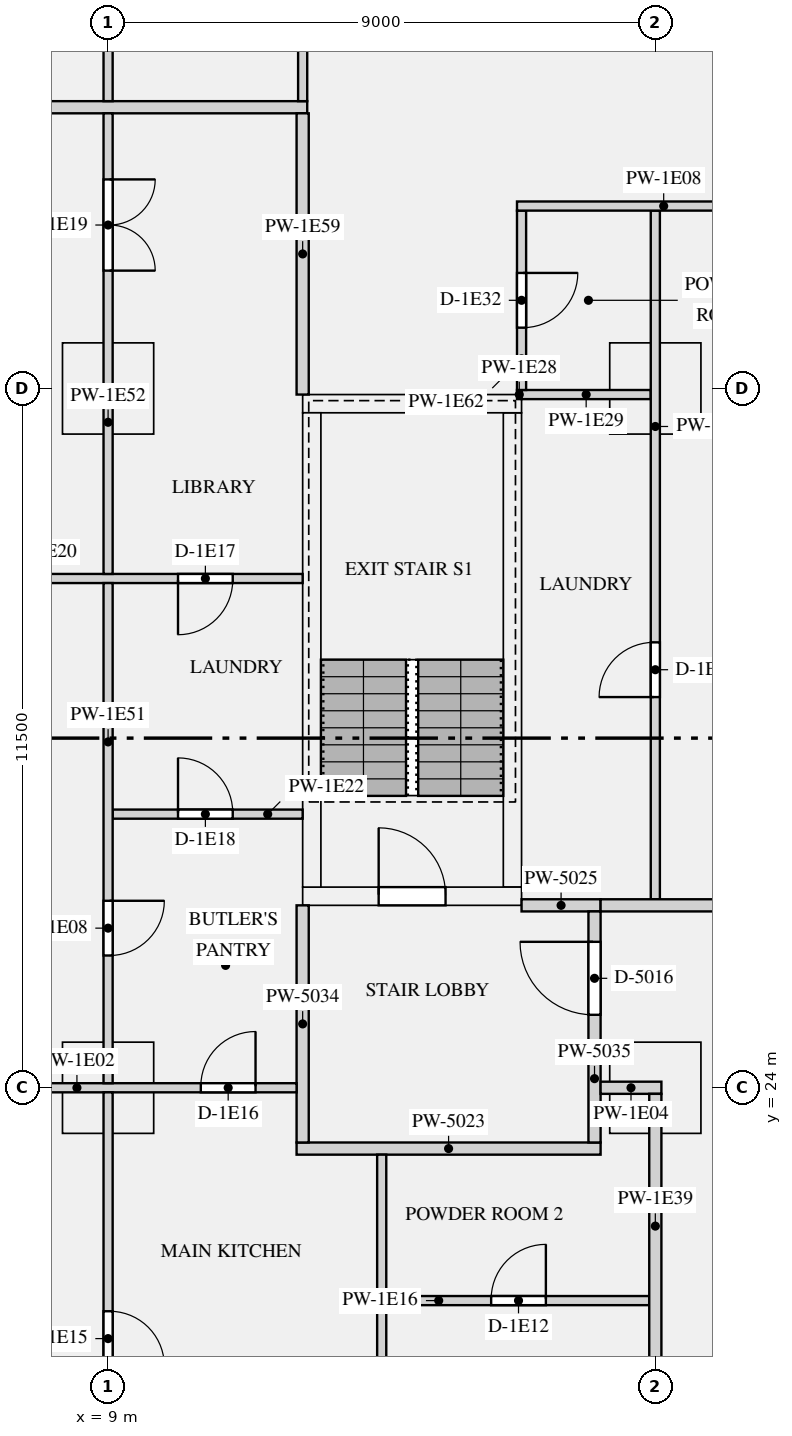
"""IFC4 building model, lengths in metres.
Left out: names, types, materials, properties, quantities, classifications, styles, units other than length and angle.
Written with IfcOpenShell. Run it as: python <this file> out.ifc"""

import sys

from ifc_helpers import new_model, si_unit, direction, frame, frame_2d, origin, origin_2d, place, context, subcontext, project, spatial, rectangle, extrude, element, fill, save


model = new_model("IFC4")
c1 = context("Model", 3, precision=1e-05, world=origin(), true_north=direction((0.0, 1.0)))
c2 = subcontext(c1, "Body", "Model", "MODEL_VIEW")
j1 = project(units=[si_unit("LENGTHUNIT", "METRE"), si_unit("PLANEANGLEUNIT", "RADIAN")], contexts=[c1])
p1 = place(None, origin())
s1 = spatial("IfcSite", under=j1, at=p1, CompositionType="ELEMENT")
p2 = place(p1, origin())
s2 = spatial("IfcBuilding", under=s1, at=p2, CompositionType="ELEMENT")
p3 = place(p2, frame((0.0, 0.0, 54.15)))
s3 = spatial("IfcBuildingStorey", under=s2, at=p3, CompositionType="ELEMENT", Elevation=54.15)
for number, where, z_axis, x_axis in (
    (1, (9.0, 24.0, 0.0), (0.0, 0.0, 1.0), (1.0, 0.0, 0.0)),
    (2, (18.0, 24.0, 0.0), (0.0, 0.0, 1.0), (1.0, 0.0, 0.0)),
    (3, (9.0, 35.5, 0.0), (0.0, 0.0, 1.0), (1.0, 0.0, 0.0)),
    (4, (18.0, 35.5, 0.0), (0.0, 0.0, 1.0), (1.0, 0.0, 0.0)),
):
    element("IfcColumn", number, at=place(p3, frame(where, z_axis=z_axis, x_axis=x_axis)), inside=s3, PredefinedType="COLUMN", context=c2, shape_type="SweptSolid", body=[
        extrude(rectangle(XDim=1.5, YDim=1.5, at=origin_2d()), origin(), (0.0, 0.0, 1.0), 3.15),
    ])
p4 = place(p3, frame((12.2, 27.15, 0.0), z_axis=(0.0, 0.0, 1.0), x_axis=(1.0, 0.0, 0.0)))
e5 = element("IfcWall", 5, at=p4, inside=s3, PredefinedType="SHEAR", context=c2, shape_type="SweptSolid", body=[
    extrude(rectangle(XDim=3.6, YDim=0.3, at=frame_2d((1.8, 0.0))), origin(), (0.0, 0.0, 1.0), 3.15),
])
p5 = place(p4, frame((1.25, 0.0, 0.0)))
e6 = element("IfcOpeningElement", 6, at=p5, cuts=e5, PredefinedType="OPENING", context=c2, shape_type="SweptSolid", body=[
    extrude(rectangle(XDim=1.1, YDim=2.1, at=frame_2d((0.55, 1.05))), frame((0.0, 0.16, 0.0), z_axis=(0.0, -1.0, 0.0), x_axis=(1.0, 0.0, 0.0)), (0.0, 0.0, 1.0), 0.32),
])
p6 = place(p3, frame((12.2, 35.25, 0.0), z_axis=(0.0, 0.0, 1.0), x_axis=(1.0, 0.0, 0.0)))
e7 = element("IfcWall", 7, at=p6, inside=s3, PredefinedType="SHEAR", context=c2, shape_type="SweptSolid", body=[
    extrude(rectangle(XDim=3.6, YDim=0.3, at=frame_2d((1.8, 0.0))), origin(), (0.0, 0.0, 1.0), 3.15),
])
for number, where, z_axis, x_axis in (
    (8, (12.35, 27.3, 0.0), (0.0, 0.0, 1.0), (0.0, 1.0, 0.0)),
    (9, (15.65, 27.3, 0.0), (0.0, 0.0, 1.0), (0.0, 1.0, 0.0)),
):
    element("IfcWall", number, at=place(p3, frame(where, z_axis=z_axis, x_axis=x_axis)), inside=s3, PredefinedType="SHEAR", context=c2, shape_type="SweptSolid", body=[
        extrude(rectangle(XDim=7.8, YDim=0.3, at=frame_2d((3.9, 0.0))), origin(), (0.0, 0.0, 1.0), 3.15),
    ])
p7 = place(p3, frame((12.1, 23.0, 0.0), z_axis=(0.0, 0.0, 1.0), x_axis=(1.0, 0.0, 0.0)))
e10 = element("IfcWall", 10, at=p7, inside=s3, PredefinedType="PARTITIONING", context=c2, shape_type="SweptSolid", body=[
    extrude(rectangle(XDim=5.0, YDim=0.2, at=frame_2d((2.5, 0.0))), origin(), (0.0, 0.0, 1.0), 2.83),
])
p8 = place(p3, frame((15.8, 27.0, 0.0), z_axis=(0.0, 0.0, 1.0), x_axis=(1.0, 0.0, 0.0)))
e11 = element("IfcWall", 11, at=p8, inside=s3, PredefinedType="PARTITIONING", context=c2, shape_type="SweptSolid", body=[
    extrude(rectangle(XDim=1.3, YDim=0.2, at=frame_2d((0.65, 0.0))), origin(), (0.0, 0.0, 1.0), 2.83),
])
p9 = place(p3, frame((12.2, 23.1, 0.0), z_axis=(0.0, 0.0, 1.0), x_axis=(0.0, 1.0, 0.0)))
e12 = element("IfcWall", 12, at=p9, inside=s3, PredefinedType="PARTITIONING", context=c2, shape_type="SweptSolid", body=[
    extrude(rectangle(XDim=3.9, YDim=0.2, at=frame_2d((1.95, 0.0))), origin(), (0.0, 0.0, 1.0), 2.83),
])
p10 = place(p3, frame((17.0, 23.1, 0.0), z_axis=(0.0, 0.0, 1.0), x_axis=(0.0, 1.0, 0.0)))
e13 = element("IfcWall", 13, at=p10, inside=s3, PredefinedType="PARTITIONING", context=c2, shape_type="SweptSolid", body=[
    extrude(rectangle(XDim=3.8, YDim=0.2, at=frame_2d((1.9, 0.0))), origin(), (0.0, 0.0, 1.0), 2.83),
])
p11 = place(p10, frame((2.1, 0.0, 0.0)))
e14 = element("IfcOpeningElement", 14, at=p11, cuts=e13, PredefinedType="OPENING", context=c2, shape_type="SweptSolid", body=[
    extrude(rectangle(XDim=1.2, YDim=2.1, at=frame_2d((0.6, 1.05))), frame((0.0, 0.11, 0.0), z_axis=(0.0, -1.0, 0.0), x_axis=(1.0, 0.0, 0.0)), (0.0, 0.0, 1.0), 0.22),
])
p12 = place(p3, frame((3.3, 24.0, 0.0), z_axis=(0.0, 0.0, 1.0), x_axis=(1.0, 0.0, 0.0)))
e15 = element("IfcWall", 15, at=p12, inside=s3, PredefinedType="PARTITIONING", context=c2, shape_type="SweptSolid", body=[
    extrude(rectangle(XDim=8.8, YDim=0.15, at=frame_2d((4.4, 0.0))), origin(), (0.0, 0.0, 1.0), 2.83),
])
p13 = place(p12, frame((1.65, 0.0, 0.0)))
e16 = element("IfcOpeningElement", 16, at=p13, cuts=e15, PredefinedType="OPENING", context=c2, shape_type="SweptSolid", body=[
    extrude(rectangle(XDim=1.5, YDim=2.1, at=frame_2d((0.75, 1.05))), frame((0.0, 0.085, 0.0), z_axis=(0.0, -1.0, 0.0), x_axis=(1.0, 0.0, 0.0)), (0.0, 0.0, 1.0), 0.17),
])
p14 = place(p12, frame((7.225, 0.0, 0.0)))
e17 = element("IfcOpeningElement", 17, at=p14, cuts=e15, PredefinedType="OPENING", context=c2, shape_type="SweptSolid", body=[
    extrude(rectangle(XDim=0.9, YDim=2.1, at=frame_2d((0.45, 1.05))), frame((0.0, 0.085, 0.0), z_axis=(0.0, -1.0, 0.0), x_axis=(1.0, 0.0, 0.0)), (0.0, 0.0, 1.0), 0.17),
])
p15 = place(p3, frame((17.1, 24.0, 0.0), z_axis=(0.0, 0.0, 1.0), x_axis=(1.0, 0.0, 0.0)))
e18 = element("IfcWall", 18, at=p15, inside=s3, PredefinedType="PARTITIONING", context=c2, shape_type="SweptSolid", body=[
    extrude(rectangle(XDim=1.0, YDim=0.2, at=frame_2d((0.5, 0.0))), origin(), (0.0, 0.0, 1.0), 2.83),
])
p16 = place(p3, frame((17.1, 27.0, 0.0), z_axis=(0.0, 0.0, 1.0), x_axis=(1.0, 0.0, 0.0)))
e19 = element("IfcWall", 19, at=p16, inside=s3, PredefinedType="PARTITIONING", context=c2, shape_type="SweptSolid", body=[
    extrude(rectangle(XDim=7.0, YDim=0.2, at=frame_2d((3.5, 0.0))), origin(), (0.0, 0.0, 1.0), 2.83),
])
p17 = place(p3, frame((15.725, 38.5, 0.0), z_axis=(0.0, 0.0, 1.0), x_axis=(1.0, 0.0, 0.0)))
e20 = element("IfcWall", 20, at=p17, inside=s3, PredefinedType="PARTITIONING", context=c2, shape_type="SweptSolid", body=[
    extrude(rectangle(XDim=8.375, YDim=0.15, at=frame_2d((4.188, 0.0))), origin(), (0.0, 0.0, 1.0), 2.83),
])
p18 = place(p17, frame((4.825, 0.0, 0.0)))
e21 = element("IfcOpeningElement", 21, at=p18, cuts=e20, PredefinedType="OPENING", context=c2, shape_type="SweptSolid", body=[
    extrude(rectangle(XDim=0.9, YDim=2.1, at=frame_2d((0.45, 1.05))), frame((0.0, 0.085, 0.0), z_axis=(0.0, -1.0, 0.0), x_axis=(1.0, 0.0, 0.0)), (0.0, 0.0, 1.0), 0.17),
])
p19 = place(p3, frame((13.575, 20.5, 0.0), z_axis=(0.0, 0.0, 1.0), x_axis=(1.0, 0.0, 0.0)))
e22 = element("IfcWall", 22, at=p19, inside=s3, PredefinedType="PARTITIONING", context=c2, shape_type="SweptSolid", body=[
    extrude(rectangle(XDim=4.325, YDim=0.15, at=frame_2d((2.163, 0.0))), origin(), (0.0, 0.0, 1.0), 2.83),
])
p20 = place(p19, frame((1.725, 0.0, 0.0)))
e23 = element("IfcOpeningElement", 23, at=p20, cuts=e22, PredefinedType="OPENING", context=c2, shape_type="SweptSolid", body=[
    extrude(rectangle(XDim=0.9, YDim=2.1, at=frame_2d((0.45, 1.05))), frame((0.0, 0.085, 0.0), z_axis=(0.0, -1.0, 0.0), x_axis=(1.0, 0.0, 0.0)), (0.0, 0.0, 1.0), 0.17),
])
p21 = place(p3, frame((0.8, 32.375, 0.0), z_axis=(0.0, 0.0, 1.0), x_axis=(1.0, 0.0, 0.0)))
e24 = element("IfcWall", 24, at=p21, inside=s3, PredefinedType="PARTITIONING", context=c2, shape_type="SweptSolid", body=[
    extrude(rectangle(XDim=11.4, YDim=0.15, at=frame_2d((5.7, 0.0))), origin(), (0.0, 0.0, 1.0), 2.83),
])
p22 = place(p21, frame((3.275, 0.0, 0.0)))
e25 = element("IfcOpeningElement", 25, at=p22, cuts=e24, PredefinedType="OPENING", context=c2, shape_type="SweptSolid", body=[
    extrude(rectangle(XDim=1.5, YDim=2.1, at=frame_2d((0.75, 1.05))), frame((0.0, 0.085, 0.0), z_axis=(0.0, -1.0, 0.0), x_axis=(1.0, 0.0, 0.0)), (0.0, 0.0, 1.0), 0.17),
])
p23 = place(p21, frame((9.35, 0.0, 0.0)))
e26 = element("IfcOpeningElement", 26, at=p23, cuts=e24, PredefinedType="OPENING", context=c2, shape_type="SweptSolid", body=[
    extrude(rectangle(XDim=0.9, YDim=2.1, at=frame_2d((0.45, 1.05))), frame((0.0, 0.085, 0.0), z_axis=(0.0, -1.0, 0.0), x_axis=(1.0, 0.0, 0.0)), (0.0, 0.0, 1.0), 0.17),
])
p24 = place(p3, frame((9.075, 28.5, 0.0), z_axis=(0.0, 0.0, 1.0), x_axis=(1.0, 0.0, 0.0)))
e27 = element("IfcWall", 27, at=p24, inside=s3, PredefinedType="PARTITIONING", context=c2, shape_type="SweptSolid", body=[
    extrude(rectangle(XDim=3.125, YDim=0.15, at=frame_2d((1.562, 0.0))), origin(), (0.0, 0.0, 1.0), 2.83),
])
p25 = place(p24, frame((1.075, 0.0, 0.0)))
e28 = element("IfcOpeningElement", 28, at=p25, cuts=e27, PredefinedType="OPENING", context=c2, shape_type="SweptSolid", body=[
    extrude(rectangle(XDim=0.9, YDim=2.1, at=frame_2d((0.45, 1.05))), frame((0.0, 0.085, 0.0), z_axis=(0.0, -1.0, 0.0), x_axis=(1.0, 0.0, 0.0)), (0.0, 0.0, 1.0), 0.17),
])
p26 = place(p3, frame((0.8, 40.125, 0.0), z_axis=(0.0, 0.0, 1.0), x_axis=(1.0, 0.0, 0.0)))
e29 = element("IfcWall", 29, at=p26, inside=s3, PredefinedType="PARTITIONING", context=c2, shape_type="SweptSolid", body=[
    extrude(rectangle(XDim=11.475, YDim=0.2, at=frame_2d((5.737, 0.0))), origin(), (0.0, 0.0, 1.0), 2.83),
])
p27 = place(p3, frame((15.725, 35.4, 0.0), z_axis=(0.0, 0.0, 1.0), x_axis=(1.0, 0.0, 0.0)))
e30 = element("IfcWall", 30, at=p27, inside=s3, PredefinedType="PARTITIONING", context=c2, shape_type="SweptSolid", body=[
    extrude(rectangle(XDim=0.075, YDim=0.15, at=frame_2d((0.038, 0.0))), origin(), (0.0, 0.0, 1.0), 2.83),
])
p28 = place(p3, frame((15.8, 35.4, 0.0), z_axis=(0.0, 0.0, 1.0), x_axis=(1.0, 0.0, 0.0)))
e31 = element("IfcWall", 31, at=p28, inside=s3, PredefinedType="PARTITIONING", context=c2, shape_type="SweptSolid", body=[
    extrude(rectangle(XDim=2.125, YDim=0.15, at=frame_2d((1.062, 0.0))), origin(), (0.0, 0.0, 1.0), 2.83),
])
p29 = place(p3, frame((18.0, 27.1, 0.0), z_axis=(0.0, 0.0, 1.0), x_axis=(0.0, 1.0, 0.0)))
e32 = element("IfcWall", 32, at=p29, inside=s3, PredefinedType="PARTITIONING", context=c2, shape_type="SweptSolid", body=[
    extrude(rectangle(XDim=11.325, YDim=0.15, at=frame_2d((5.663, 0.0))), origin(), (0.0, 0.0, 1.0), 2.83),
])
p30 = place(p29, frame((3.325, 0.0, 0.0)))
e33 = element("IfcOpeningElement", 33, at=p30, cuts=e32, PredefinedType="OPENING", context=c2, shape_type="SweptSolid", body=[
    extrude(rectangle(XDim=0.9, YDim=2.1, at=frame_2d((0.45, 1.05))), frame((0.0, 0.085, 0.0), z_axis=(0.0, -1.0, 0.0), x_axis=(1.0, 0.0, 0.0)), (0.0, 0.0, 1.0), 0.17),
])
p31 = place(p3, frame((18.0, 16.1, 0.0), z_axis=(0.0, 0.0, 1.0), x_axis=(0.0, 1.0, 0.0)))
e34 = element("IfcWall", 34, at=p31, inside=s3, PredefinedType="PARTITIONING", context=c2, shape_type="SweptSolid", body=[
    extrude(rectangle(XDim=7.8, YDim=0.2, at=frame_2d((3.9, 0.0))), origin(), (0.0, 0.0, 1.0), 2.83),
])
p32 = place(p31, frame((2.35, 0.0, 0.0)))
e35 = element("IfcOpeningElement", 35, at=p32, cuts=e34, PredefinedType="OPENING", context=c2, shape_type="SweptSolid", body=[
    extrude(rectangle(XDim=1.1, YDim=2.1, at=frame_2d((0.55, 1.05))), frame((0.0, 0.11, 0.0), z_axis=(0.0, -1.0, 0.0), x_axis=(1.0, 0.0, 0.0)), (0.0, 0.0, 1.0), 0.22),
])
p33 = place(p3, frame((9.0, 12.575, 0.0), z_axis=(0.0, 0.0, 1.0), x_axis=(0.0, 1.0, 0.0)))
e36 = element("IfcWall", 36, at=p33, inside=s3, PredefinedType="PARTITIONING", context=c2, shape_type="SweptSolid", body=[
    extrude(rectangle(XDim=11.35, YDim=0.15, at=frame_2d((5.675, 0.0))), origin(), (0.0, 0.0, 1.0), 2.83),
])
p34 = place(p33, frame((6.85, 0.0, 0.0)))
e37 = element("IfcOpeningElement", 37, at=p34, cuts=e36, PredefinedType="OPENING", context=c2, shape_type="SweptSolid", body=[
    extrude(rectangle(XDim=0.9, YDim=2.1, at=frame_2d((0.45, 1.05))), frame((0.0, 0.085, 0.0), z_axis=(0.0, -1.0, 0.0), x_axis=(1.0, 0.0, 0.0)), (0.0, 0.0, 1.0), 0.17),
])
p35 = place(p3, frame((9.0, 24.075, 0.0), z_axis=(0.0, 0.0, 1.0), x_axis=(0.0, 1.0, 0.0)))
e38 = element("IfcWall", 38, at=p35, inside=s3, PredefinedType="PARTITIONING", context=c2, shape_type="SweptSolid", body=[
    extrude(rectangle(XDim=8.225, YDim=0.15, at=frame_2d((4.113, 0.0))), origin(), (0.0, 0.0, 1.0), 2.83),
])
p36 = place(p35, frame((2.1, 0.0, 0.0)))
e39 = element("IfcOpeningElement", 39, at=p36, cuts=e38, PredefinedType="OPENING", context=c2, shape_type="SweptSolid", body=[
    extrude(rectangle(XDim=0.9, YDim=2.1, at=frame_2d((0.45, 1.05))), frame((0.0, 0.085, 0.0), z_axis=(0.0, -1.0, 0.0), x_axis=(1.0, 0.0, 0.0)), (0.0, 0.0, 1.0), 0.17),
])
p37 = place(p3, frame((9.0, 32.45, 0.0), z_axis=(0.0, 0.0, 1.0), x_axis=(0.0, 1.0, 0.0)))
e40 = element("IfcWall", 40, at=p37, inside=s3, PredefinedType="PARTITIONING", context=c2, shape_type="SweptSolid", body=[
    extrude(rectangle(XDim=7.575, YDim=0.15, at=frame_2d((3.788, 0.0))), origin(), (0.0, 0.0, 1.0), 2.83),
])
p38 = place(p37, frame((4.988, 0.0, 0.0)))
e41 = element("IfcOpeningElement", 41, at=p38, cuts=e40, PredefinedType="OPENING", context=c2, shape_type="SweptSolid", body=[
    extrude(rectangle(XDim=1.5, YDim=2.1, at=frame_2d((0.75, 1.05))), frame((0.0, 0.085, 0.0), z_axis=(0.0, -1.0, 0.0), x_axis=(1.0, 0.0, 0.0)), (0.0, 0.0, 1.0), 0.17),
])
p39 = place(p3, frame((9.0, 40.225, 0.0), z_axis=(0.0, 0.0, 1.0), x_axis=(0.0, 1.0, 0.0)))
e42 = element("IfcWall", 42, at=p39, inside=s3, PredefinedType="PARTITIONING", context=c2, shape_type="SweptSolid", body=[
    extrude(rectangle(XDim=3.7, YDim=0.15, at=frame_2d((1.85, 0.0))), origin(), (0.0, 0.0, 1.0), 2.83),
])
p40 = place(p39, frame((1.437, 0.0, 0.0)))
e43 = element("IfcOpeningElement", 43, at=p40, cuts=e42, PredefinedType="OPENING", context=c2, shape_type="SweptSolid", body=[
    extrude(rectangle(XDim=0.8, YDim=2.1, at=frame_2d((0.4, 1.05))), frame((0.0, 0.085, 0.0), z_axis=(0.0, -1.0, 0.0), x_axis=(1.0, 0.0, 0.0)), (0.0, 0.0, 1.0), 0.17),
])
p41 = place(p3, frame((13.5, 9.575, 0.0), z_axis=(0.0, 0.0, 1.0), x_axis=(0.0, 1.0, 0.0)))
e44 = element("IfcWall", 44, at=p41, inside=s3, PredefinedType="PARTITIONING", context=c2, shape_type="SweptSolid", body=[
    extrude(rectangle(XDim=13.325, YDim=0.15, at=frame_2d((6.663, 0.0))), origin(), (0.0, 0.0, 1.0), 2.83),
])
p42 = place(p41, frame((8.475, 0.0, 0.0)))
e45 = element("IfcOpeningElement", 45, at=p42, cuts=e44, PredefinedType="OPENING", context=c2, shape_type="SweptSolid", body=[
    extrude(rectangle(XDim=0.9, YDim=2.1, at=frame_2d((0.45, 1.05))), frame((0.0, 0.085, 0.0), z_axis=(0.0, -1.0, 0.0), x_axis=(1.0, 0.0, 0.0)), (0.0, 0.0, 1.0), 0.17),
])
p43 = place(p41, frame((4.475, 0.0, 0.0)))
e46 = element("IfcOpeningElement", 46, at=p43, cuts=e44, PredefinedType="OPENING", context=c2, shape_type="SweptSolid", body=[
    extrude(rectangle(XDim=0.9, YDim=2.1, at=frame_2d((0.45, 1.05))), frame((0.0, 0.085, 0.0), z_axis=(0.0, -1.0, 0.0), x_axis=(1.0, 0.0, 0.0)), (0.0, 0.0, 1.0), 0.17),
])
p44 = place(p3, frame((12.2, 40.225, 0.0), z_axis=(0.0, 0.0, 1.0), x_axis=(0.0, 1.0, 0.0)))
e47 = element("IfcWall", 47, at=p44, inside=s3, PredefinedType="PARTITIONING", context=c2, shape_type="SweptSolid", body=[
    extrude(rectangle(XDim=3.7, YDim=0.15, at=frame_2d((1.85, 0.0))), origin(), (0.0, 0.0, 1.0), 2.83),
])
p45 = place(p3, frame((12.2, 35.4, 0.0), z_axis=(0.0, 0.0, 1.0), x_axis=(0.0, 1.0, 0.0)))
e48 = element("IfcWall", 48, at=p45, inside=s3, PredefinedType="PARTITIONING", context=c2, shape_type="SweptSolid", body=[
    extrude(rectangle(XDim=4.625, YDim=0.2, at=frame_2d((2.312, 0.0))), origin(), (0.0, 0.0, 1.0), 2.83),
])
p46 = place(p3, frame((15.8, 35.475, 0.0), z_axis=(0.0, 0.0, 1.0), x_axis=(0.0, 1.0, 0.0)))
e49 = element("IfcWall", 49, at=p46, inside=s3, PredefinedType="PARTITIONING", context=c2, shape_type="SweptSolid", body=[
    extrude(rectangle(XDim=2.95, YDim=0.15, at=frame_2d((1.475, 0.0))), origin(), (0.0, 0.0, 1.0), 2.83),
])
p47 = place(p46, frame((1.025, 0.0, 0.0)))
e50 = element("IfcOpeningElement", 50, at=p47, cuts=e49, PredefinedType="OPENING", context=c2, shape_type="SweptSolid", body=[
    extrude(rectangle(XDim=0.9, YDim=2.1, at=frame_2d((0.45, 1.05))), frame((0.0, 0.085, 0.0), z_axis=(0.0, -1.0, 0.0), x_axis=(1.0, 0.0, 0.0)), (0.0, 0.0, 1.0), 0.17),
])
p48 = place(p5, origin())
e51 = element("IfcDoor", 51, at=p48, inside=s3, OperationType="SINGLE_SWING_LEFT", PredefinedType="DOOR", context=c2, shape_type="SweptSolid", body=[
    extrude(rectangle(XDim=1.1, YDim=2.1, at=frame_2d((0.55, 1.05))), frame((0.0, 0.025, 0.0), z_axis=(0.0, -1.0, 0.0), x_axis=(1.0, 0.0, 0.0)), (0.0, 0.0, 1.0), 0.05),
])
fill(e6, e51)
p49 = place(p11, origin())
e52 = element("IfcDoor", 52, at=p49, inside=s3, OperationType="SINGLE_SWING_RIGHT", PredefinedType="DOOR", context=c2, shape_type="SweptSolid", body=[
    extrude(rectangle(XDim=1.2, YDim=2.1, at=frame_2d((0.6, 1.05))), frame((0.0, 0.025, 0.0), z_axis=(0.0, -1.0, 0.0), x_axis=(1.0, 0.0, 0.0)), (0.0, 0.0, 1.0), 0.05),
])
fill(e14, e52)
p50 = place(p36, frame((0.9, 0.0, 0.0), z_axis=(0.0, 0.0, 1.0), x_axis=(-1.0, 0.0, 0.0)))
e53 = element("IfcDoor", 53, at=p50, inside=s3, OperationType="SINGLE_SWING_LEFT", PredefinedType="DOOR", context=c2, shape_type="SweptSolid", body=[
    extrude(rectangle(XDim=0.9, YDim=2.1, at=frame_2d((0.45, 1.05))), frame((0.0, 0.025, 0.0), z_axis=(0.0, -1.0, 0.0), x_axis=(1.0, 0.0, 0.0)), (0.0, 0.0, 1.0), 0.05),
])
fill(e39, e53)
p51 = place(p20, origin())
e54 = element("IfcDoor", 54, at=p51, inside=s3, OperationType="SINGLE_SWING_RIGHT", PredefinedType="DOOR", context=c2, shape_type="SweptSolid", body=[
    extrude(rectangle(XDim=0.9, YDim=2.1, at=frame_2d((0.45, 1.05))), frame((0.0, 0.025, 0.0), z_axis=(0.0, -1.0, 0.0), x_axis=(1.0, 0.0, 0.0)), (0.0, 0.0, 1.0), 0.05),
])
fill(e23, e54)
p52 = place(p34, frame((0.9, 0.0, 0.0), z_axis=(0.0, 0.0, 1.0), x_axis=(-1.0, 0.0, 0.0)))
e55 = element("IfcDoor", 55, at=p52, inside=s3, OperationType="SINGLE_SWING_RIGHT", PredefinedType="DOOR", context=c2, shape_type="SweptSolid", body=[
    extrude(rectangle(XDim=0.9, YDim=2.1, at=frame_2d((0.45, 1.05))), frame((0.0, 0.025, 0.0), z_axis=(0.0, -1.0, 0.0), x_axis=(1.0, 0.0, 0.0)), (0.0, 0.0, 1.0), 0.05),
])
fill(e37, e55)
p53 = place(p14, origin())
e56 = element("IfcDoor", 56, at=p53, inside=s3, OperationType="SINGLE_SWING_RIGHT", PredefinedType="DOOR", context=c2, shape_type="SweptSolid", body=[
    extrude(rectangle(XDim=0.9, YDim=2.1, at=frame_2d((0.45, 1.05))), frame((0.0, 0.025, 0.0), z_axis=(0.0, -1.0, 0.0), x_axis=(1.0, 0.0, 0.0)), (0.0, 0.0, 1.0), 0.05),
])
fill(e17, e56)
p54 = place(p23, frame((0.9, 0.0, 0.0), z_axis=(0.0, 0.0, 1.0), x_axis=(-1.0, 0.0, 0.0)))
e57 = element("IfcDoor", 57, at=p54, inside=s3, OperationType="SINGLE_SWING_RIGHT", PredefinedType="DOOR", context=c2, shape_type="SweptSolid", body=[
    extrude(rectangle(XDim=0.9, YDim=2.1, at=frame_2d((0.45, 1.05))), frame((0.0, 0.025, 0.0), z_axis=(0.0, -1.0, 0.0), x_axis=(1.0, 0.0, 0.0)), (0.0, 0.0, 1.0), 0.05),
])
fill(e26, e57)
p55 = place(p25, origin())
e58 = element("IfcDoor", 58, at=p55, inside=s3, OperationType="SINGLE_SWING_LEFT", PredefinedType="DOOR", context=c2, shape_type="SweptSolid", body=[
    extrude(rectangle(XDim=0.9, YDim=2.1, at=frame_2d((0.45, 1.05))), frame((0.0, 0.025, 0.0), z_axis=(0.0, -1.0, 0.0), x_axis=(1.0, 0.0, 0.0)), (0.0, 0.0, 1.0), 0.05),
])
fill(e28, e58)
p56 = place(p38, frame((1.5, 0.0, 0.0), z_axis=(0.0, 0.0, 1.0), x_axis=(-1.0, 0.0, 0.0)))
e59 = element("IfcDoor", 59, at=p56, inside=s3, OperationType="DOUBLE_DOOR_SINGLE_SWING", PredefinedType="DOOR", context=c2, shape_type="SweptSolid", body=[
    extrude(rectangle(XDim=1.5, YDim=2.1, at=frame_2d((0.75, 1.05))), frame((0.0, 0.025, 0.0), z_axis=(0.0, -1.0, 0.0), x_axis=(1.0, 0.0, 0.0)), (0.0, 0.0, 1.0), 0.05),
])
fill(e41, e59)
p57 = place(p47, frame((0.9, 0.0, 0.0), z_axis=(0.0, 0.0, 1.0), x_axis=(-1.0, 0.0, 0.0)))
e60 = element("IfcDoor", 60, at=p57, inside=s3, OperationType="SINGLE_SWING_LEFT", PredefinedType="DOOR", context=c2, shape_type="SweptSolid", body=[
    extrude(rectangle(XDim=0.9, YDim=2.1, at=frame_2d((0.45, 1.05))), frame((0.0, 0.025, 0.0), z_axis=(0.0, -1.0, 0.0), x_axis=(1.0, 0.0, 0.0)), (0.0, 0.0, 1.0), 0.05),
])
fill(e50, e60)
p58 = place(p30, origin())
e61 = element("IfcDoor", 61, at=p58, inside=s3, OperationType="SINGLE_SWING_LEFT", PredefinedType="DOOR", context=c2, shape_type="SweptSolid", body=[
    extrude(rectangle(XDim=0.9, YDim=2.1, at=frame_2d((0.45, 1.05))), frame((0.0, 0.025, 0.0), z_axis=(0.0, -1.0, 0.0), x_axis=(1.0, 0.0, 0.0)), (0.0, 0.0, 1.0), 0.05),
])
fill(e33, e61)
save(model, sys.argv[1])
